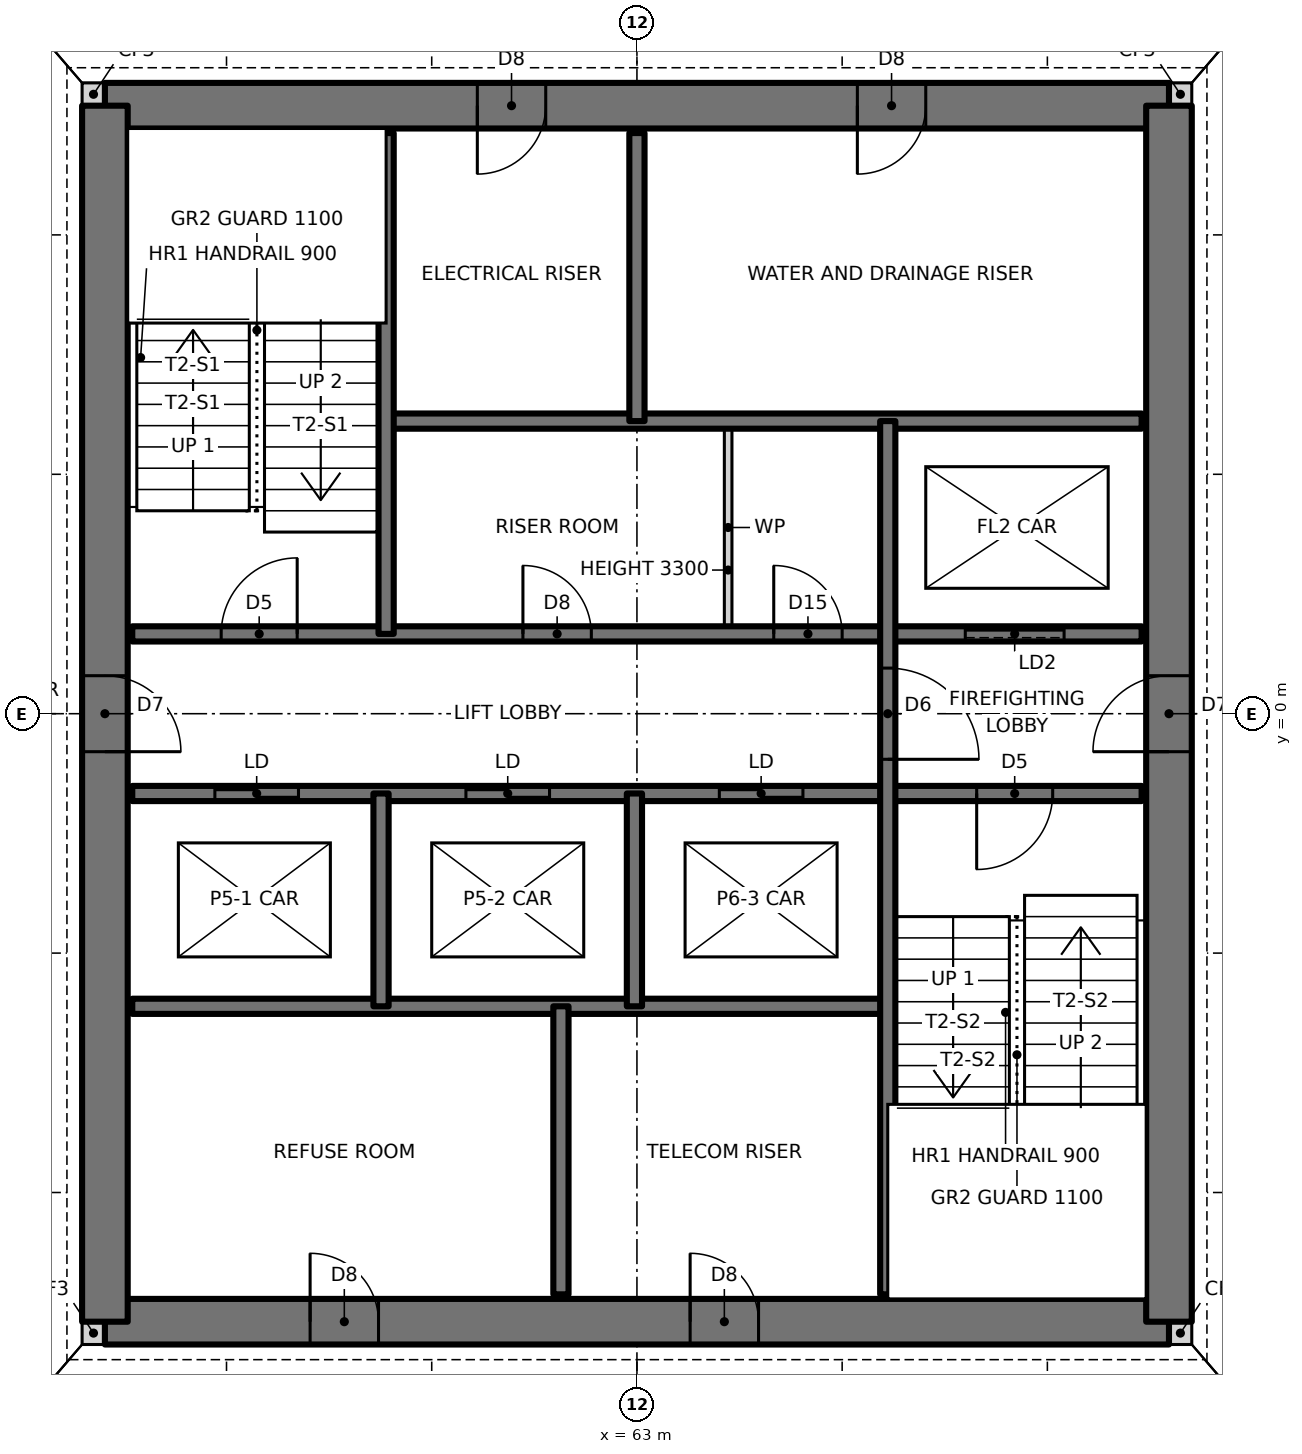
"""IFC4 building model, lengths in metres.
Left out: names, types, materials, properties, quantities, classifications, styles, units other than length and angle.
Written with IfcOpenShell. Run it as: python <this file> out.ifc"""

import sys

from ifc_helpers import new_model, si_unit, direction, frame, frame_2d, origin, place, context, subcontext, project, spatial, rectangle, extrude, element, fill, save


model = new_model("IFC4")
c1 = context("Model", 3, precision=1e-05, world=origin(), true_north=direction((0.0, 1.0)))
c2 = subcontext(c1, "Body", "Model", "MODEL_VIEW")
j1 = project(units=[si_unit("LENGTHUNIT", "METRE"), si_unit("PLANEANGLEUNIT", "RADIAN")], contexts=[c1])
p1 = place(None, origin())
s1 = spatial("IfcSite", under=j1, at=p1, CompositionType="ELEMENT")
p2 = place(p1, origin())
s2 = spatial("IfcBuilding", under=s1, at=p2, CompositionType="ELEMENT")
p3 = place(p2, frame((0.0, 0.0, 60.5)))
s3 = spatial("IfcBuildingStorey", under=s2, at=p3, CompositionType="ELEMENT", Elevation=60.5)
for number, where, z_axis, x_axis in (
    (1, (55.7, -8.15, 0.0), (0.0, 0.0, 1.0), (1.0, 0.0, 0.0)),
    (2, (70.0, -8.15, 0.0), (0.0, 0.0, 1.0), (1.0, 0.0, 0.0)),
    (3, (70.0, 8.15, 0.0), (0.0, 0.0, 1.0), (1.0, 0.0, 0.0)),
    (4, (55.7, 8.15, 0.0), (0.0, 0.0, 1.0), (1.0, 0.0, 0.0)),
):
    element("IfcWall", number, at=place(p3, frame(where, z_axis=z_axis, x_axis=x_axis)), inside=s3, PredefinedType="SOLIDWALL", context=c2, shape_type="SweptSolid", body=[
        extrude(rectangle(XDim=0.3, YDim=0.3, at=frame_2d((0.15, 0.0))), origin(), (0.0, 0.0, 1.0), 3.5),
    ])
p4 = place(p3, frame((56.0, -8.0, 0.0), z_axis=(0.0, 0.0, 1.0), x_axis=(1.0, 0.0, 0.0)))
e5 = element("IfcWall", 5, at=p4, inside=s3, PredefinedType="SHEAR", context=c2, shape_type="SweptSolid", body=[
    extrude(rectangle(XDim=14.0, YDim=0.6, at=frame_2d((7.0, 0.0))), origin(), (0.0, 0.0, 1.0), 3.5),
])
p5 = place(p4, frame((2.7, 0.0, 0.0)))
e6 = element("IfcOpeningElement", 6, at=p5, cuts=e5, PredefinedType="OPENING", context=c2, shape_type="SweptSolid", body=[
    extrude(rectangle(XDim=0.9, YDim=2.1, at=frame_2d((0.45, 1.05))), frame((0.0, 0.31, 0.0), z_axis=(0.0, -1.0, 0.0), x_axis=(1.0, 0.0, 0.0)), (0.0, 0.0, 1.0), 0.62),
])
p6 = place(p4, frame((7.7, 0.0, 0.0)))
e7 = element("IfcOpeningElement", 7, at=p6, cuts=e5, PredefinedType="OPENING", context=c2, shape_type="SweptSolid", body=[
    extrude(rectangle(XDim=0.9, YDim=2.1, at=frame_2d((0.45, 1.05))), frame((0.0, 0.31, 0.0), z_axis=(0.0, -1.0, 0.0), x_axis=(1.0, 0.0, 0.0)), (0.0, 0.0, 1.0), 0.62),
])
p7 = place(p3, frame((70.0, 8.0, 0.0), z_axis=(0.0, 0.0, 1.0), x_axis=(-1.0, 0.0, 0.0)))
e8 = element("IfcWall", 8, at=p7, inside=s3, PredefinedType="SHEAR", context=c2, shape_type="SweptSolid", body=[
    extrude(rectangle(XDim=14.0, YDim=0.6, at=frame_2d((7.0, 0.0))), origin(), (0.0, 0.0, 1.0), 3.5),
])
p8 = place(p7, frame((8.2, 0.0, 0.0)))
e9 = element("IfcOpeningElement", 9, at=p8, cuts=e8, PredefinedType="OPENING", context=c2, shape_type="SweptSolid", body=[
    extrude(rectangle(XDim=0.9, YDim=2.1, at=frame_2d((0.45, 1.05))), frame((0.0, 0.31, 0.0), z_axis=(0.0, -1.0, 0.0), x_axis=(1.0, 0.0, 0.0)), (0.0, 0.0, 1.0), 0.62),
])
p9 = place(p7, frame((3.2, 0.0, 0.0)))
e10 = element("IfcOpeningElement", 10, at=p9, cuts=e8, PredefinedType="OPENING", context=c2, shape_type="SweptSolid", body=[
    extrude(rectangle(XDim=0.9, YDim=2.1, at=frame_2d((0.45, 1.05))), frame((0.0, 0.31, 0.0), z_axis=(0.0, -1.0, 0.0), x_axis=(1.0, 0.0, 0.0)), (0.0, 0.0, 1.0), 0.62),
])
p10 = place(p3, frame((70.0, -8.0, 0.0), z_axis=(0.0, 0.0, 1.0), x_axis=(0.0, 1.0, 0.0)))
e11 = element("IfcWall", 11, at=p10, inside=s3, PredefinedType="SHEAR", context=c2, shape_type="SweptSolid", body=[
    extrude(rectangle(XDim=16.0, YDim=0.6, at=frame_2d((8.0, 0.0))), origin(), (0.0, 0.0, 1.0), 3.5),
])
p11 = place(p10, frame((7.5, 0.0, 0.0)))
e12 = element("IfcOpeningElement", 12, at=p11, cuts=e11, PredefinedType="OPENING", context=c2, shape_type="SweptSolid", body=[
    extrude(rectangle(XDim=1.0, YDim=2.1, at=frame_2d((0.5, 1.05))), frame((0.0, 0.31, 0.0), z_axis=(0.0, -1.0, 0.0), x_axis=(1.0, 0.0, 0.0)), (0.0, 0.0, 1.0), 0.62),
])
p12 = place(p3, frame((56.0, 8.0, 0.0), z_axis=(0.0, 0.0, 1.0), x_axis=(0.0, -1.0, 0.0)))
e13 = element("IfcWall", 13, at=p12, inside=s3, PredefinedType="SHEAR", context=c2, shape_type="SweptSolid", body=[
    extrude(rectangle(XDim=16.0, YDim=0.6, at=frame_2d((8.0, 0.0))), origin(), (0.0, 0.0, 1.0), 3.5),
])
p13 = place(p12, frame((7.5, 0.0, 0.0)))
e14 = element("IfcOpeningElement", 14, at=p13, cuts=e13, PredefinedType="OPENING", context=c2, shape_type="SweptSolid", body=[
    extrude(rectangle(XDim=1.0, YDim=2.1, at=frame_2d((0.5, 1.05))), frame((0.0, 0.31, 0.0), z_axis=(0.0, -1.0, 0.0), x_axis=(1.0, 0.0, 0.0)), (0.0, 0.0, 1.0), 0.62),
])
p14 = place(p3, frame((56.36, -3.85, 0.0), z_axis=(0.0, 0.0, 1.0), x_axis=(1.0, 0.0, 0.0)))
e15 = element("IfcWall", 15, at=p14, inside=s3, PredefinedType="SOLIDWALL", context=c2, shape_type="SweptSolid", body=[
    extrude(rectangle(XDim=9.94, YDim=0.2, at=frame_2d((4.97, 0.0))), origin(), (0.0, 0.0, 1.0), 3.5),
])
p15 = place(p3, frame((56.36, -1.05, 0.0), z_axis=(0.0, 0.0, 1.0), x_axis=(1.0, 0.0, 0.0)))
e16 = element("IfcWall", 16, at=p15, inside=s3, PredefinedType="SOLIDWALL", context=c2, shape_type="SweptSolid", body=[
    extrude(rectangle(XDim=13.28, YDim=0.2, at=frame_2d((6.64, 0.0))), origin(), (0.0, 0.0, 1.0), 3.5),
])
p16 = place(p15, frame((11.11, 0.0, 0.0)))
e17 = element("IfcOpeningElement", 17, at=p16, cuts=e16, PredefinedType="OPENING", context=c2, shape_type="SweptSolid", body=[
    extrude(rectangle(XDim=1.0, YDim=2.1, at=frame_2d((0.5, 1.05))), frame((0.0, 0.11, 0.0), z_axis=(0.0, -1.0, 0.0), x_axis=(1.0, 0.0, 0.0)), (0.0, 0.0, 1.0), 0.22),
])
p17 = place(p15, frame((1.087, 0.0, 0.0)))
e18 = element("IfcOpeningElement", 18, at=p17, cuts=e16, PredefinedType="OPENING", context=c2, shape_type="SweptSolid", body=[
    extrude(rectangle(XDim=1.1, YDim=2.1, at=frame_2d((0.55, 1.05))), frame((0.0, 0.11, 0.0), z_axis=(0.0, -1.0, 0.0), x_axis=(1.0, 0.0, 0.0)), (0.0, 0.0, 1.0), 0.22),
])
p18 = place(p15, frame((4.39, 0.0, 0.0)))
e19 = element("IfcOpeningElement", 19, at=p18, cuts=e16, PredefinedType="OPENING", context=c2, shape_type="SweptSolid", body=[
    extrude(rectangle(XDim=1.1, YDim=2.1, at=frame_2d((0.55, 1.05))), frame((0.0, 0.11, 0.0), z_axis=(0.0, -1.0, 0.0), x_axis=(1.0, 0.0, 0.0)), (0.0, 0.0, 1.0), 0.22),
])
p19 = place(p15, frame((7.724, 0.0, 0.0)))
e20 = element("IfcOpeningElement", 20, at=p19, cuts=e16, PredefinedType="OPENING", context=c2, shape_type="SweptSolid", body=[
    extrude(rectangle(XDim=1.1, YDim=2.1, at=frame_2d((0.55, 1.05))), frame((0.0, 0.11, 0.0), z_axis=(0.0, -1.0, 0.0), x_axis=(1.0, 0.0, 0.0)), (0.0, 0.0, 1.0), 0.22),
])
p20 = place(p3, frame((56.36, 1.05, 0.0), z_axis=(0.0, 0.0, 1.0), x_axis=(1.0, 0.0, 0.0)))
e21 = element("IfcWall", 21, at=p20, inside=s3, PredefinedType="SOLIDWALL", context=c2, shape_type="SweptSolid", body=[
    extrude(rectangle(XDim=13.28, YDim=0.2, at=frame_2d((6.64, 0.0))), origin(), (0.0, 0.0, 1.0), 3.5),
])
p21 = place(p20, frame((1.17, 0.0, 0.0)))
e22 = element("IfcOpeningElement", 22, at=p21, cuts=e21, PredefinedType="OPENING", context=c2, shape_type="SweptSolid", body=[
    extrude(rectangle(XDim=1.0, YDim=2.1, at=frame_2d((0.5, 1.05))), frame((0.0, 0.11, 0.0), z_axis=(0.0, -1.0, 0.0), x_axis=(1.0, 0.0, 0.0)), (0.0, 0.0, 1.0), 0.22),
])
p22 = place(p20, frame((5.14, 0.0, 0.0)))
e23 = element("IfcOpeningElement", 23, at=p22, cuts=e21, PredefinedType="OPENING", context=c2, shape_type="SweptSolid", body=[
    extrude(rectangle(XDim=0.9, YDim=2.1, at=frame_2d((0.45, 1.05))), frame((0.0, 0.11, 0.0), z_axis=(0.0, -1.0, 0.0), x_axis=(1.0, 0.0, 0.0)), (0.0, 0.0, 1.0), 0.22),
])
p23 = place(p20, frame((8.44, 0.0, 0.0)))
e24 = element("IfcOpeningElement", 24, at=p23, cuts=e21, PredefinedType="OPENING", context=c2, shape_type="SweptSolid", body=[
    extrude(rectangle(XDim=0.9, YDim=2.1, at=frame_2d((0.45, 1.05))), frame((0.0, 0.11, 0.0), z_axis=(0.0, -1.0, 0.0), x_axis=(1.0, 0.0, 0.0)), (0.0, 0.0, 1.0), 0.22),
])
p24 = place(p20, frame((10.96, 0.0, 0.0)))
e25 = element("IfcOpeningElement", 25, at=p24, cuts=e21, PredefinedType="OPENING", context=c2, shape_type="SweptSolid", body=[
    extrude(rectangle(XDim=1.3, YDim=2.1, at=frame_2d((0.65, 1.05))), frame((0.0, 0.11, 0.0), z_axis=(0.0, -1.0, 0.0), x_axis=(1.0, 0.0, 0.0)), (0.0, 0.0, 1.0), 0.22),
])
p25 = place(p3, frame((59.7, 3.85, 0.0), z_axis=(0.0, 0.0, 1.0), x_axis=(1.0, 0.0, 0.0)))
e26 = element("IfcWall", 26, at=p25, inside=s3, PredefinedType="SOLIDWALL", context=c2, shape_type="SweptSolid", body=[
    extrude(rectangle(XDim=9.94, YDim=0.2, at=frame_2d((4.97, 0.0))), origin(), (0.0, 0.0, 1.0), 3.5),
])
p26 = place(p3, frame((66.3, -7.64, 0.0), z_axis=(0.0, 0.0, 1.0), x_axis=(0.0, 1.0, 0.0)))
e27 = element("IfcWall", 27, at=p26, inside=s3, PredefinedType="SOLIDWALL", context=c2, shape_type="SweptSolid", body=[
    extrude(rectangle(XDim=11.49, YDim=0.2, at=frame_2d((5.745, 0.0))), origin(), (0.0, 0.0, 1.0), 3.5),
])
p27 = place(p26, frame((7.04, 0.0, 0.0)))
e28 = element("IfcOpeningElement", 28, at=p27, cuts=e27, PredefinedType="OPENING", context=c2, shape_type="SweptSolid", body=[
    extrude(rectangle(XDim=1.2, YDim=2.1, at=frame_2d((0.6, 1.05))), frame((0.0, 0.11, 0.0), z_axis=(0.0, -1.0, 0.0), x_axis=(1.0, 0.0, 0.0)), (0.0, 0.0, 1.0), 0.22),
])
p28 = place(p3, frame((64.2, 1.05, 0.0), z_axis=(0.0, 0.0, 1.0), x_axis=(0.0, 1.0, 0.0)))
e29 = element("IfcWall", 29, at=p28, inside=s3, PredefinedType="PARTITIONING", context=c2, shape_type="SweptSolid", body=[
    extrude(rectangle(XDim=2.8, YDim=0.1, at=frame_2d((1.4, 0.0))), origin(), (0.0, 0.0, 1.0), 3.3),
])
p29 = place(p3, frame((63.0, 3.85, 0.0), z_axis=(0.0, 0.0, 1.0), x_axis=(0.0, 1.0, 0.0)))
e30 = element("IfcWall", 30, at=p29, inside=s3, PredefinedType="SOLIDWALL", context=c2, shape_type="SweptSolid", body=[
    extrude(rectangle(XDim=3.79, YDim=0.2, at=frame_2d((1.895, 0.0))), origin(), (0.0, 0.0, 1.0), 3.5),
])
p30 = place(p3, frame((62.967, -3.85, 0.0), z_axis=(0.0, 0.0, 1.0), x_axis=(0.0, 1.0, 0.0)))
e31 = element("IfcWall", 31, at=p30, inside=s3, PredefinedType="SOLIDWALL", context=c2, shape_type="SweptSolid", body=[
    extrude(rectangle(XDim=2.8, YDim=0.2, at=frame_2d((1.4, 0.0))), origin(), (0.0, 0.0, 1.0), 3.5),
])
p31 = place(p3, frame((62.0, -7.64, 0.0), z_axis=(0.0, 0.0, 1.0), x_axis=(0.0, 1.0, 0.0)))
e32 = element("IfcWall", 32, at=p31, inside=s3, PredefinedType="SOLIDWALL", context=c2, shape_type="SweptSolid", body=[
    extrude(rectangle(XDim=3.79, YDim=0.2, at=frame_2d((1.895, 0.0))), origin(), (0.0, 0.0, 1.0), 3.5),
])
p32 = place(p3, frame((59.7, 1.05, 0.0), z_axis=(0.0, 0.0, 1.0), x_axis=(0.0, 1.0, 0.0)))
e33 = element("IfcWall", 33, at=p32, inside=s3, PredefinedType="SOLIDWALL", context=c2, shape_type="SweptSolid", body=[
    extrude(rectangle(XDim=6.59, YDim=0.2, at=frame_2d((3.295, 0.0))), origin(), (0.0, 0.0, 1.0), 3.5),
])
p33 = place(p3, frame((59.633, -3.85, 0.0), z_axis=(0.0, 0.0, 1.0), x_axis=(0.0, 1.0, 0.0)))
e34 = element("IfcWall", 34, at=p33, inside=s3, PredefinedType="SOLIDWALL", context=c2, shape_type="SweptSolid", body=[
    extrude(rectangle(XDim=2.8, YDim=0.2, at=frame_2d((1.4, 0.0))), origin(), (0.0, 0.0, 1.0), 3.5),
])
p34 = place(p21, origin())
e35 = element("IfcDoor", 35, at=p34, inside=s3, OperationType="SINGLE_SWING_RIGHT", PredefinedType="DOOR", context=c2, shape_type="SweptSolid", body=[
    extrude(rectangle(XDim=1.0, YDim=2.1, at=frame_2d((0.5, 1.05))), frame((0.0, 0.025, 0.0), z_axis=(0.0, -1.0, 0.0), x_axis=(1.0, 0.0, 0.0)), (0.0, 0.0, 1.0), 0.05),
])
fill(e22, e35)
p35 = place(p16, frame((1.0, 0.0, 0.0), z_axis=(0.0, 0.0, 1.0), x_axis=(-1.0, 0.0, 0.0)))
e36 = element("IfcDoor", 36, at=p35, inside=s3, OperationType="SINGLE_SWING_RIGHT", PredefinedType="DOOR", context=c2, shape_type="SweptSolid", body=[
    extrude(rectangle(XDim=1.0, YDim=2.1, at=frame_2d((0.5, 1.05))), frame((0.0, 0.025, 0.0), z_axis=(0.0, -1.0, 0.0), x_axis=(1.0, 0.0, 0.0)), (0.0, 0.0, 1.0), 0.05),
])
fill(e17, e36)
p36 = place(p27, frame((1.2, 0.0, 0.0), z_axis=(0.0, 0.0, 1.0), x_axis=(-1.0, 0.0, 0.0)))
e37 = element("IfcDoor", 37, at=p36, inside=s3, OperationType="SINGLE_SWING_RIGHT", PredefinedType="DOOR", context=c2, shape_type="SweptSolid", body=[
    extrude(rectangle(XDim=1.2, YDim=2.1, at=frame_2d((0.6, 1.05))), frame((0.0, 0.025, 0.0), z_axis=(0.0, -1.0, 0.0), x_axis=(1.0, 0.0, 0.0)), (0.0, 0.0, 1.0), 0.05),
])
fill(e28, e37)
p37 = place(p22, origin())
e38 = element("IfcDoor", 38, at=p37, inside=s3, OperationType="SINGLE_SWING_LEFT", PredefinedType="DOOR", context=c2, shape_type="SweptSolid", body=[
    extrude(rectangle(XDim=0.9, YDim=2.1, at=frame_2d((0.45, 1.05))), frame((0.0, 0.025, 0.0), z_axis=(0.0, -1.0, 0.0), x_axis=(1.0, 0.0, 0.0)), (0.0, 0.0, 1.0), 0.05),
])
fill(e23, e38)
p38 = place(p23, origin())
e39 = element("IfcDoor", 39, at=p38, inside=s3, OperationType="SINGLE_SWING_LEFT", PredefinedType="DOOR", context=c2, shape_type="SweptSolid", body=[
    extrude(rectangle(XDim=0.9, YDim=2.1, at=frame_2d((0.45, 1.05))), frame((0.0, 0.025, 0.0), z_axis=(0.0, -1.0, 0.0), x_axis=(1.0, 0.0, 0.0)), (0.0, 0.0, 1.0), 0.05),
])
fill(e24, e39)
p39 = place(p13, origin())
e40 = element("IfcDoor", 40, at=p39, inside=s3, OperationType="SINGLE_SWING_RIGHT", PredefinedType="DOOR", context=c2, shape_type="SweptSolid", body=[
    extrude(rectangle(XDim=1.0, YDim=2.1, at=frame_2d((0.5, 1.05))), frame((0.0, 0.025, 0.0), z_axis=(0.0, -1.0, 0.0), x_axis=(1.0, 0.0, 0.0)), (0.0, 0.0, 1.0), 0.05),
])
fill(e14, e40)
p40 = place(p11, origin())
e41 = element("IfcDoor", 41, at=p40, inside=s3, OperationType="SINGLE_SWING_LEFT", PredefinedType="DOOR", context=c2, shape_type="SweptSolid", body=[
    extrude(rectangle(XDim=1.0, YDim=2.1, at=frame_2d((0.5, 1.05))), frame((0.0, 0.025, 0.0), z_axis=(0.0, -1.0, 0.0), x_axis=(1.0, 0.0, 0.0)), (0.0, 0.0, 1.0), 0.05),
])
fill(e12, e41)
p41 = place(p8, origin())
e42 = element("IfcDoor", 42, at=p41, inside=s3, OperationType="SINGLE_SWING_RIGHT", PredefinedType="DOOR", context=c2, shape_type="SweptSolid", body=[
    extrude(rectangle(XDim=0.9, YDim=2.1, at=frame_2d((0.45, 1.05))), frame((0.0, 0.025, 0.0), z_axis=(0.0, -1.0, 0.0), x_axis=(1.0, 0.0, 0.0)), (0.0, 0.0, 1.0), 0.05),
])
fill(e9, e42)
p42 = place(p9, origin())
e43 = element("IfcDoor", 43, at=p42, inside=s3, OperationType="SINGLE_SWING_RIGHT", PredefinedType="DOOR", context=c2, shape_type="SweptSolid", body=[
    extrude(rectangle(XDim=0.9, YDim=2.1, at=frame_2d((0.45, 1.05))), frame((0.0, 0.025, 0.0), z_axis=(0.0, -1.0, 0.0), x_axis=(1.0, 0.0, 0.0)), (0.0, 0.0, 1.0), 0.05),
])
fill(e10, e43)
p43 = place(p5, origin())
e44 = element("IfcDoor", 44, at=p43, inside=s3, OperationType="SINGLE_SWING_LEFT", PredefinedType="DOOR", context=c2, shape_type="SweptSolid", body=[
    extrude(rectangle(XDim=0.9, YDim=2.1, at=frame_2d((0.45, 1.05))), frame((0.0, 0.025, 0.0), z_axis=(0.0, -1.0, 0.0), x_axis=(1.0, 0.0, 0.0)), (0.0, 0.0, 1.0), 0.05),
])
fill(e6, e44)
p44 = place(p6, origin())
e45 = element("IfcDoor", 45, at=p44, inside=s3, OperationType="SINGLE_SWING_LEFT", PredefinedType="DOOR", context=c2, shape_type="SweptSolid", body=[
    extrude(rectangle(XDim=0.9, YDim=2.1, at=frame_2d((0.45, 1.05))), frame((0.0, 0.025, 0.0), z_axis=(0.0, -1.0, 0.0), x_axis=(1.0, 0.0, 0.0)), (0.0, 0.0, 1.0), 0.05),
])
fill(e7, e45)
p45 = place(p17, origin())
e46 = element("IfcDoor", 46, at=p45, inside=s3, OperationType="DOUBLE_DOOR_SLIDING", PredefinedType="DOOR", context=c2, shape_type="SweptSolid", body=[
    extrude(rectangle(XDim=1.1, YDim=2.1, at=frame_2d((0.55, 1.05))), frame((0.0, 0.025, 0.0), z_axis=(0.0, -1.0, 0.0), x_axis=(1.0, 0.0, 0.0)), (0.0, 0.0, 1.0), 0.05),
])
fill(e18, e46)
p46 = place(p18, origin())
e47 = element("IfcDoor", 47, at=p46, inside=s3, OperationType="DOUBLE_DOOR_SLIDING", PredefinedType="DOOR", context=c2, shape_type="SweptSolid", body=[
    extrude(rectangle(XDim=1.1, YDim=2.1, at=frame_2d((0.55, 1.05))), frame((0.0, 0.025, 0.0), z_axis=(0.0, -1.0, 0.0), x_axis=(1.0, 0.0, 0.0)), (0.0, 0.0, 1.0), 0.05),
])
fill(e19, e47)
p47 = place(p19, origin())
e48 = element("IfcDoor", 48, at=p47, inside=s3, OperationType="DOUBLE_DOOR_SLIDING", PredefinedType="DOOR", context=c2, shape_type="SweptSolid", body=[
    extrude(rectangle(XDim=1.1, YDim=2.1, at=frame_2d((0.55, 1.05))), frame((0.0, 0.025, 0.0), z_axis=(0.0, -1.0, 0.0), x_axis=(1.0, 0.0, 0.0)), (0.0, 0.0, 1.0), 0.05),
])
fill(e20, e48)
p48 = place(p24, origin())
e49 = element("IfcDoor", 49, at=p48, inside=s3, OperationType="SLIDING_TO_LEFT", PredefinedType="DOOR", context=c2, shape_type="SweptSolid", body=[
    extrude(rectangle(XDim=1.3, YDim=2.1, at=frame_2d((0.65, 1.05))), frame((0.0, 0.025, 0.0), z_axis=(0.0, -1.0, 0.0), x_axis=(1.0, 0.0, 0.0)), (0.0, 0.0, 1.0), 0.05),
])
fill(e25, e49)
save(model, sys.argv[1])
